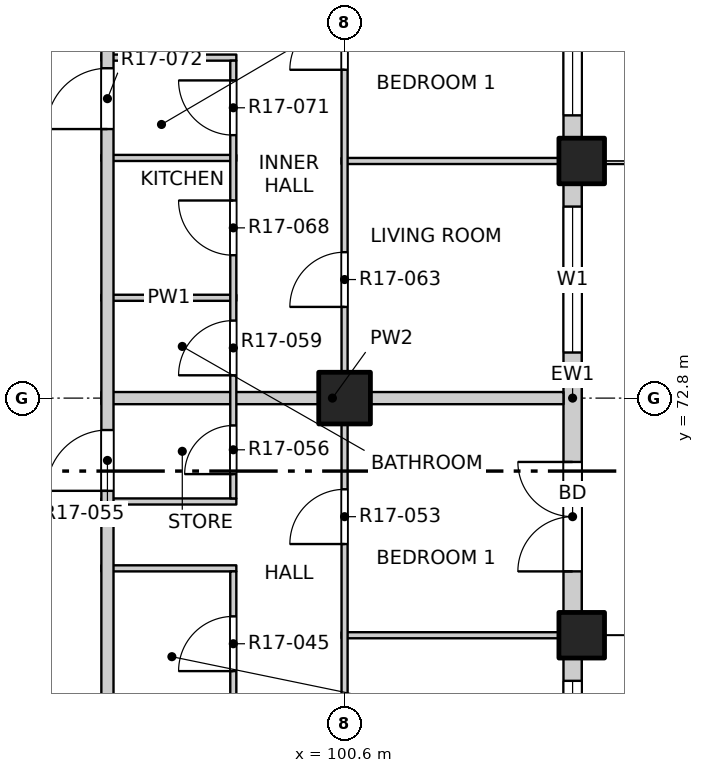
"""IFC4 building model, lengths in metres.
Left out: names, types, materials, properties, quantities, classifications, styles, units other than length and angle.
Written with IfcOpenShell. Run it as: python <this file> out.ifc"""

import sys

from ifc_helpers import new_model, si_unit, direction, frame, frame_2d, origin, origin_2d, place, context, subcontext, project, spatial, rectangle, extrude, element, fill, save


model = new_model("IFC4")
c1 = context("Model", 3, precision=1e-05, world=origin(), true_north=direction((0.0, 1.0)))
c2 = subcontext(c1, "Body", "Model", "MODEL_VIEW")
j1 = project(units=[si_unit("LENGTHUNIT", "METRE"), si_unit("PLANEANGLEUNIT", "RADIAN")], contexts=[c1])
p1 = place(None, origin())
s1 = spatial("IfcSite", under=j1, at=p1, CompositionType="ELEMENT")
p2 = place(p1, origin())
s2 = spatial("IfcBuilding", under=s1, at=p2, CompositionType="ELEMENT")
p3 = place(p2, frame((0.0, 0.0, 182.6)))
s3 = spatial("IfcBuildingStorey", under=s2, at=p3, CompositionType="ELEMENT", Elevation=182.6)
for number, where, z_axis, x_axis in (
    (1, (104.5, 68.9, -0.25), (0.0, 0.0, 1.0), (1.0, 0.0, 0.0)),
    (2, (104.5, 76.7, -0.25), (0.0, 0.0, 1.0), (1.0, 0.0, 0.0)),
):
    element("IfcColumn", number, at=place(p3, frame(where, z_axis=z_axis, x_axis=x_axis)), inside=s3, PredefinedType="COLUMN", context=c2, shape_type="SweptSolid", body=[
        extrude(rectangle(XDim=0.75, YDim=0.75, at=origin_2d()), origin(), (0.0, 0.0, 1.0), 3.4),
    ])
p4 = place(p3, frame((100.6, 72.8, -0.25), z_axis=(0.0, 0.0, 1.0), x_axis=(1.0, 0.0, 0.0)))
e3 = element("IfcColumn", 3, at=p4, inside=s3, PredefinedType="COLUMN", context=c2, shape_type="SweptSolid", body=[
    extrude(rectangle(XDim=0.85, YDim=0.85, at=origin_2d()), origin(), (0.0, 0.0, 1.0), 3.4),
])
p5 = place(p3, frame((104.35, 61.475, 0.0), z_axis=(0.0, 0.0, 1.0), x_axis=(0.0, 1.0, 0.0)))
e4 = element("IfcWall", 4, at=p5, inside=s3, PredefinedType="SOLIDWALL", context=c2, shape_type="SweptSolid", body=[
    extrude(rectangle(XDim=7.05, YDim=0.3, at=frame_2d((3.525, 0.0))), origin(), (0.0, 0.0, 1.0), 2.7),
])
p6 = place(p5, frame((0.675, 0.0, 0.0)))
e5 = element("IfcOpeningElement", 5, at=p6, cuts=e4, PredefinedType="OPENING", context=c2, shape_type="SweptSolid", body=[
    extrude(rectangle(XDim=1.8, YDim=2.4, at=frame_2d((0.9, 1.2))), frame((0.0, 0.16, 0.0), z_axis=(0.0, -1.0, 0.0), x_axis=(1.0, 0.0, 0.0)), (0.0, 0.0, 1.0), 0.32),
])
p7 = place(p5, frame((4.275, 0.0, 0.9)))
e6 = element("IfcOpeningElement", 6, at=p7, cuts=e4, PredefinedType="OPENING", context=c2, shape_type="SweptSolid", body=[
    extrude(rectangle(XDim=2.4, YDim=1.8, at=frame_2d((1.2, 0.9))), frame((0.0, 0.16, 0.0), z_axis=(0.0, -1.0, 0.0), x_axis=(1.0, 0.0, 0.0)), (0.0, 0.0, 1.0), 0.32),
])
p8 = place(p3, frame((104.35, 69.275, 0.0), z_axis=(0.0, 0.0, 1.0), x_axis=(0.0, 1.0, 0.0)))
e7 = element("IfcWall", 7, at=p8, inside=s3, PredefinedType="SOLIDWALL", context=c2, shape_type="SweptSolid", body=[
    extrude(rectangle(XDim=7.05, YDim=0.3, at=frame_2d((3.525, 0.0))), origin(), (0.0, 0.0, 1.0), 2.7),
])
p9 = place(p8, frame((0.675, 0.0, 0.0)))
e8 = element("IfcOpeningElement", 8, at=p9, cuts=e7, PredefinedType="OPENING", context=c2, shape_type="SweptSolid", body=[
    extrude(rectangle(XDim=1.8, YDim=2.4, at=frame_2d((0.9, 1.2))), frame((0.0, 0.16, 0.0), z_axis=(0.0, -1.0, 0.0), x_axis=(1.0, 0.0, 0.0)), (0.0, 0.0, 1.0), 0.32),
])
p10 = place(p8, frame((4.275, 0.0, 0.9)))
e9 = element("IfcOpeningElement", 9, at=p10, cuts=e7, PredefinedType="OPENING", context=c2, shape_type="SweptSolid", body=[
    extrude(rectangle(XDim=2.4, YDim=1.8, at=frame_2d((1.2, 0.9))), frame((0.0, 0.16, 0.0), z_axis=(0.0, -1.0, 0.0), x_axis=(1.0, 0.0, 0.0)), (0.0, 0.0, 1.0), 0.32),
])
p11 = place(p3, frame((104.35, 77.075, 0.0), z_axis=(0.0, 0.0, 1.0), x_axis=(0.0, 1.0, 0.0)))
e10 = element("IfcWall", 10, at=p11, inside=s3, PredefinedType="SOLIDWALL", context=c2, shape_type="SweptSolid", body=[
    extrude(rectangle(XDim=3.525, YDim=0.3, at=frame_2d((1.763, 0.0))), origin(), (0.0, 0.0, 1.0), 2.7),
])
p12 = place(p11, frame((0.375, 0.0, 0.9)))
e11 = element("IfcOpeningElement", 11, at=p12, cuts=e10, PredefinedType="OPENING", context=c2, shape_type="SweptSolid", body=[
    extrude(rectangle(XDim=2.4, YDim=1.8, at=frame_2d((1.2, 0.9))), frame((0.0, 0.16, 0.0), z_axis=(0.0, -1.0, 0.0), x_axis=(1.0, 0.0, 0.0)), (0.0, 0.0, 1.0), 0.32),
])
p13 = place(p3, frame((100.55, 68.9, 0.0), z_axis=(0.0, 0.0, 1.0), x_axis=(1.0, 0.0, 0.0)))
e12 = element("IfcWall", 12, at=p13, inside=s3, PredefinedType="PARTITIONING", context=c2, shape_type="SweptSolid", body=[
    extrude(rectangle(XDim=3.65, YDim=0.1, at=frame_2d((1.825, 0.0))), origin(), (0.0, 0.0, 1.0), 2.55),
])
for number, where, z_axis, x_axis in (
    (13, (96.6, 70.0, 0.0), (0.0, 0.0, 1.0), (1.0, 0.0, 0.0)),
    (14, (96.6, 71.1, 0.0), (0.0, 0.0, 1.0), (1.0, 0.0, 0.0)),
):
    element("IfcWall", number, at=place(p3, frame(where, z_axis=z_axis, x_axis=x_axis)), inside=s3, PredefinedType="PARTITIONING", context=c2, shape_type="SweptSolid", body=[
        extrude(rectangle(XDim=2.22, YDim=0.1, at=frame_2d((1.11, 0.0))), origin(), (0.0, 0.0, 1.0), 3.15),
    ])
p14 = place(p3, frame((96.6, 72.8, 0.0), z_axis=(0.0, 0.0, 1.0), x_axis=(1.0, 0.0, 0.0)))
e15 = element("IfcWall", 15, at=p14, inside=s3, PredefinedType="PARTITIONING", context=c2, shape_type="SweptSolid", body=[
    extrude(rectangle(XDim=7.6, YDim=0.2, at=frame_2d((3.8, 0.0))), origin(), (0.0, 0.0, 1.0), 3.15),
])
p15 = place(p3, frame((96.6, 74.45, 0.0), z_axis=(0.0, 0.0, 1.0), x_axis=(1.0, 0.0, 0.0)))
e16 = element("IfcWall", 16, at=p15, inside=s3, PredefinedType="PARTITIONING", context=c2, shape_type="SweptSolid", body=[
    extrude(rectangle(XDim=2.22, YDim=0.1, at=frame_2d((1.11, 0.0))), origin(), (0.0, 0.0, 1.0), 3.15),
])
p16 = place(p3, frame((100.55, 76.7, 0.0), z_axis=(0.0, 0.0, 1.0), x_axis=(1.0, 0.0, 0.0)))
e17 = element("IfcWall", 17, at=p16, inside=s3, PredefinedType="PARTITIONING", context=c2, shape_type="SweptSolid", body=[
    extrude(rectangle(XDim=3.65, YDim=0.1, at=frame_2d((1.825, 0.0))), origin(), (0.0, 0.0, 1.0), 2.55),
])
p17 = place(p3, frame((96.6, 76.75, 0.0), z_axis=(0.0, 0.0, 1.0), x_axis=(1.0, 0.0, 0.0)))
e18 = element("IfcWall", 18, at=p17, inside=s3, PredefinedType="PARTITIONING", context=c2, shape_type="SweptSolid", body=[
    extrude(rectangle(XDim=2.22, YDim=0.1, at=frame_2d((1.11, 0.0))), origin(), (0.0, 0.0, 1.0), 2.55),
])
p18 = place(p3, frame((96.6, 78.4, 0.0), z_axis=(0.0, 0.0, 1.0), x_axis=(1.0, 0.0, 0.0)))
e19 = element("IfcWall", 19, at=p18, inside=s3, PredefinedType="PARTITIONING", context=c2, shape_type="SweptSolid", body=[
    extrude(rectangle(XDim=2.22, YDim=0.1, at=frame_2d((1.11, 0.0))), origin(), (0.0, 0.0, 1.0), 3.15),
])
p19 = place(p3, frame((96.7, 49.5, 0.0), z_axis=(0.0, 0.0, 1.0), x_axis=(0.0, 1.0, 0.0)))
e20 = element("IfcWall", 20, at=p19, inside=s3, PredefinedType="PARTITIONING", context=c2, shape_type="SweptSolid", body=[
    extrude(rectangle(XDim=34.7, YDim=0.2, at=frame_2d((17.35, 0.0))), origin(), (0.0, 0.0, 1.0), 3.15),
])
p20 = place(p19, frame((6.875, 0.0, 0.0)))
e21 = element("IfcOpeningElement", 21, at=p20, cuts=e20, PredefinedType="OPENING", context=c2, shape_type="SweptSolid", body=[
    extrude(rectangle(XDim=1.0, YDim=2.1, at=frame_2d((0.5, 1.05))), frame((0.0, 0.11, 0.0), z_axis=(0.0, -1.0, 0.0), x_axis=(1.0, 0.0, 0.0)), (0.0, 0.0, 1.0), 0.22),
])
p21 = place(p19, frame((21.775, 0.0, 0.0)))
e22 = element("IfcOpeningElement", 22, at=p21, cuts=e20, PredefinedType="OPENING", context=c2, shape_type="SweptSolid", body=[
    extrude(rectangle(XDim=1.0, YDim=2.1, at=frame_2d((0.5, 1.05))), frame((0.0, 0.11, 0.0), z_axis=(0.0, -1.0, 0.0), x_axis=(1.0, 0.0, 0.0)), (0.0, 0.0, 1.0), 0.22),
])
p22 = place(p19, frame((27.725, 0.0, 0.0)))
e23 = element("IfcOpeningElement", 23, at=p22, cuts=e20, PredefinedType="OPENING", context=c2, shape_type="SweptSolid", body=[
    extrude(rectangle(XDim=1.0, YDim=2.1, at=frame_2d((0.5, 1.05))), frame((0.0, 0.11, 0.0), z_axis=(0.0, -1.0, 0.0), x_axis=(1.0, 0.0, 0.0)), (0.0, 0.0, 1.0), 0.22),
])
p23 = place(p3, frame((98.77, 56.25, 0.0), z_axis=(0.0, 0.0, 1.0), x_axis=(0.0, 1.0, 0.0)))
e24 = element("IfcWall", 24, at=p23, inside=s3, PredefinedType="PARTITIONING", context=c2, shape_type="SweptSolid", body=[
    extrude(rectangle(XDim=13.7, YDim=0.1, at=frame_2d((6.85, 0.0))), origin(), (0.0, 0.0, 1.0), 3.15),
])
p24 = place(p23, frame((0.325, 0.0, 0.0)))
e25 = element("IfcOpeningElement", 25, at=p24, cuts=e24, PredefinedType="OPENING", context=c2, shape_type="SweptSolid", body=[
    extrude(rectangle(XDim=0.8, YDim=2.1, at=frame_2d((0.4, 1.05))), frame((0.0, 0.06, 0.0), z_axis=(0.0, -1.0, 0.0), x_axis=(1.0, 0.0, 0.0)), (0.0, 0.0, 1.0), 0.12),
])
p25 = place(p23, frame((1.95, 0.0, 0.0)))
e26 = element("IfcOpeningElement", 26, at=p25, cuts=e24, PredefinedType="OPENING", context=c2, shape_type="SweptSolid", body=[
    extrude(rectangle(XDim=0.9, YDim=2.1, at=frame_2d((0.45, 1.05))), frame((0.0, 0.06, 0.0), z_axis=(0.0, -1.0, 0.0), x_axis=(1.0, 0.0, 0.0)), (0.0, 0.0, 1.0), 0.12),
])
p26 = place(p23, frame((3.675, 0.0, 0.0)))
e27 = element("IfcOpeningElement", 27, at=p26, cuts=e24, PredefinedType="OPENING", context=c2, shape_type="SweptSolid", body=[
    extrude(rectangle(XDim=0.8, YDim=2.1, at=frame_2d((0.4, 1.05))), frame((0.0, 0.06, 0.0), z_axis=(0.0, -1.0, 0.0), x_axis=(1.0, 0.0, 0.0)), (0.0, 0.0, 1.0), 0.12),
])
p27 = place(p23, frame((6.16, 0.0, 0.0)))
e28 = element("IfcOpeningElement", 28, at=p27, cuts=e24, PredefinedType="OPENING", context=c2, shape_type="SweptSolid", body=[
    extrude(rectangle(XDim=0.9, YDim=2.1, at=frame_2d((0.45, 1.05))), frame((0.0, 0.06, 0.0), z_axis=(0.0, -1.0, 0.0), x_axis=(1.0, 0.0, 0.0)), (0.0, 0.0, 1.0), 0.12),
])
p28 = place(p23, frame((9.42, 0.0, 0.0)))
e29 = element("IfcOpeningElement", 29, at=p28, cuts=e24, PredefinedType="OPENING", context=c2, shape_type="SweptSolid", body=[
    extrude(rectangle(XDim=0.8, YDim=2.1, at=frame_2d((0.4, 1.05))), frame((0.0, 0.06, 0.0), z_axis=(0.0, -1.0, 0.0), x_axis=(1.0, 0.0, 0.0)), (0.0, 0.0, 1.0), 0.12),
])
p29 = place(p23, frame((12.06, 0.0, 0.0)))
e30 = element("IfcOpeningElement", 30, at=p29, cuts=e24, PredefinedType="OPENING", context=c2, shape_type="SweptSolid", body=[
    extrude(rectangle(XDim=0.9, YDim=2.1, at=frame_2d((0.45, 1.05))), frame((0.0, 0.06, 0.0), z_axis=(0.0, -1.0, 0.0), x_axis=(1.0, 0.0, 0.0)), (0.0, 0.0, 1.0), 0.12),
])
p30 = place(p3, frame((98.77, 71.15, 0.0), z_axis=(0.0, 0.0, 1.0), x_axis=(0.0, 1.0, 0.0)))
e31 = element("IfcWall", 31, at=p30, inside=s3, PredefinedType="PARTITIONING", context=c2, shape_type="SweptSolid", body=[
    extrude(rectangle(XDim=7.2, YDim=0.1, at=frame_2d((3.6, 0.0))), origin(), (0.0, 0.0, 1.0), 3.15),
])
p31 = place(p30, frame((0.4, 0.0, 0.0)))
e32 = element("IfcOpeningElement", 32, at=p31, cuts=e31, PredefinedType="OPENING", context=c2, shape_type="SweptSolid", body=[
    extrude(rectangle(XDim=0.8, YDim=2.1, at=frame_2d((0.4, 1.05))), frame((0.0, 0.06, 0.0), z_axis=(0.0, -1.0, 0.0), x_axis=(1.0, 0.0, 0.0)), (0.0, 0.0, 1.0), 0.12),
])
p32 = place(p30, frame((2.025, 0.0, 0.0)))
e33 = element("IfcOpeningElement", 33, at=p32, cuts=e31, PredefinedType="OPENING", context=c2, shape_type="SweptSolid", body=[
    extrude(rectangle(XDim=0.9, YDim=2.1, at=frame_2d((0.45, 1.05))), frame((0.0, 0.06, 0.0), z_axis=(0.0, -1.0, 0.0), x_axis=(1.0, 0.0, 0.0)), (0.0, 0.0, 1.0), 0.12),
])
p33 = place(p30, frame((4.0, 0.0, 0.0)))
e34 = element("IfcOpeningElement", 34, at=p33, cuts=e31, PredefinedType="OPENING", context=c2, shape_type="SweptSolid", body=[
    extrude(rectangle(XDim=0.9, YDim=2.1, at=frame_2d((0.45, 1.05))), frame((0.0, 0.06, 0.0), z_axis=(0.0, -1.0, 0.0), x_axis=(1.0, 0.0, 0.0)), (0.0, 0.0, 1.0), 0.12),
])
p34 = place(p30, frame((5.975, 0.0, 0.0)))
e35 = element("IfcOpeningElement", 35, at=p34, cuts=e31, PredefinedType="OPENING", context=c2, shape_type="SweptSolid", body=[
    extrude(rectangle(XDim=0.9, YDim=2.1, at=frame_2d((0.45, 1.05))), frame((0.0, 0.06, 0.0), z_axis=(0.0, -1.0, 0.0), x_axis=(1.0, 0.0, 0.0)), (0.0, 0.0, 1.0), 0.12),
])
p35 = place(p3, frame((100.6, 45.8, 0.0), z_axis=(0.0, 0.0, 1.0), x_axis=(0.0, 1.0, 0.0)))
e36 = element("IfcWall", 36, at=p35, inside=s3, PredefinedType="PARTITIONING", context=c2, shape_type="SweptSolid", body=[
    extrude(rectangle(XDim=38.4, YDim=0.1, at=frame_2d((19.2, 0.0))), origin(), (0.0, 0.0, 1.0), 3.15),
])
p36 = place(p35, frame((1.05, 0.0, 0.0)))
e37 = element("IfcOpeningElement", 37, at=p36, cuts=e36, PredefinedType="OPENING", context=c2, shape_type="SweptSolid", body=[
    extrude(rectangle(XDim=1.2, YDim=2.1, at=frame_2d((0.6, 1.05))), frame((0.0, 0.06, 0.0), z_axis=(0.0, -1.0, 0.0), x_axis=(1.0, 0.0, 0.0)), (0.0, 0.0, 1.0), 0.12),
])
p37 = place(p35, frame((5.1, 0.0, 0.0)))
e38 = element("IfcOpeningElement", 38, at=p37, cuts=e36, PredefinedType="OPENING", context=c2, shape_type="SweptSolid", body=[
    extrude(rectangle(XDim=0.9, YDim=2.1, at=frame_2d((0.45, 1.05))), frame((0.0, 0.06, 0.0), z_axis=(0.0, -1.0, 0.0), x_axis=(1.0, 0.0, 0.0)), (0.0, 0.0, 1.0), 0.12),
])
p38 = place(p35, frame((9.0, 0.0, 0.0)))
e39 = element("IfcOpeningElement", 39, at=p38, cuts=e36, PredefinedType="OPENING", context=c2, shape_type="SweptSolid", body=[
    extrude(rectangle(XDim=0.9, YDim=2.1, at=frame_2d((0.45, 1.05))), frame((0.0, 0.06, 0.0), z_axis=(0.0, -1.0, 0.0), x_axis=(1.0, 0.0, 0.0)), (0.0, 0.0, 1.0), 0.12),
])
p39 = place(p35, frame((12.9, 0.0, 0.0)))
e40 = element("IfcOpeningElement", 40, at=p39, cuts=e36, PredefinedType="OPENING", context=c2, shape_type="SweptSolid", body=[
    extrude(rectangle(XDim=0.9, YDim=2.1, at=frame_2d((0.45, 1.05))), frame((0.0, 0.06, 0.0), z_axis=(0.0, -1.0, 0.0), x_axis=(1.0, 0.0, 0.0)), (0.0, 0.0, 1.0), 0.12),
])
p40 = place(p35, frame((19.725, 0.0, 0.0)))
e41 = element("IfcOpeningElement", 41, at=p40, cuts=e36, PredefinedType="OPENING", context=c2, shape_type="SweptSolid", body=[
    extrude(rectangle(XDim=1.2, YDim=2.1, at=frame_2d((0.6, 1.05))), frame((0.0, 0.06, 0.0), z_axis=(0.0, -1.0, 0.0), x_axis=(1.0, 0.0, 0.0)), (0.0, 0.0, 1.0), 0.12),
])
p41 = place(p35, frame((24.6, 0.0, 0.0)))
e42 = element("IfcOpeningElement", 42, at=p41, cuts=e36, PredefinedType="OPENING", context=c2, shape_type="SweptSolid", body=[
    extrude(rectangle(XDim=0.9, YDim=2.1, at=frame_2d((0.45, 1.05))), frame((0.0, 0.06, 0.0), z_axis=(0.0, -1.0, 0.0), x_axis=(1.0, 0.0, 0.0)), (0.0, 0.0, 1.0), 0.12),
])
p42 = place(p35, frame((28.5, 0.0, 0.0)))
e43 = element("IfcOpeningElement", 43, at=p42, cuts=e36, PredefinedType="OPENING", context=c2, shape_type="SweptSolid", body=[
    extrude(rectangle(XDim=0.9, YDim=2.1, at=frame_2d((0.45, 1.05))), frame((0.0, 0.06, 0.0), z_axis=(0.0, -1.0, 0.0), x_axis=(1.0, 0.0, 0.0)), (0.0, 0.0, 1.0), 0.12),
])
p43 = place(p35, frame((32.4, 0.0, 0.0)))
e44 = element("IfcOpeningElement", 44, at=p43, cuts=e36, PredefinedType="OPENING", context=c2, shape_type="SweptSolid", body=[
    extrude(rectangle(XDim=0.9, YDim=2.1, at=frame_2d((0.45, 1.05))), frame((0.0, 0.06, 0.0), z_axis=(0.0, -1.0, 0.0), x_axis=(1.0, 0.0, 0.0)), (0.0, 0.0, 1.0), 0.12),
])
p44 = place(p35, frame((36.15, 0.0, 0.0)))
e45 = element("IfcOpeningElement", 45, at=p44, cuts=e36, PredefinedType="OPENING", context=c2, shape_type="SweptSolid", body=[
    extrude(rectangle(XDim=1.2, YDim=2.1, at=frame_2d((0.6, 1.05))), frame((0.0, 0.06, 0.0), z_axis=(0.0, -1.0, 0.0), x_axis=(1.0, 0.0, 0.0)), (0.0, 0.0, 1.0), 0.12),
])
p45 = place(p7, origin())
e46 = element("IfcWindow", 46, at=p45, inside=s3, PartitioningType="DOUBLE_PANEL_VERTICAL", PredefinedType="WINDOW", context=c2, shape_type="SweptSolid", body=[
    extrude(rectangle(XDim=2.4, YDim=1.8, at=frame_2d((1.2, 0.9))), frame((0.0, 0.03, 0.0), z_axis=(0.0, -1.0, 0.0), x_axis=(1.0, 0.0, 0.0)), (0.0, 0.0, 1.0), 0.06),
])
fill(e6, e46)
p46 = place(p9, origin())
e47 = element("IfcDoor", 47, at=p46, inside=s3, OperationType="DOUBLE_DOOR_SINGLE_SWING", PredefinedType="DOOR", context=c2, shape_type="SweptSolid", body=[
    extrude(rectangle(XDim=1.8, YDim=2.4, at=frame_2d((0.9, 1.2))), frame((0.0, 0.025, 0.0), z_axis=(0.0, -1.0, 0.0), x_axis=(1.0, 0.0, 0.0)), (0.0, 0.0, 1.0), 0.05),
])
fill(e8, e47)
p47 = place(p10, origin())
e48 = element("IfcWindow", 48, at=p47, inside=s3, PartitioningType="DOUBLE_PANEL_VERTICAL", PredefinedType="WINDOW", context=c2, shape_type="SweptSolid", body=[
    extrude(rectangle(XDim=2.4, YDim=1.8, at=frame_2d((1.2, 0.9))), frame((0.0, 0.03, 0.0), z_axis=(0.0, -1.0, 0.0), x_axis=(1.0, 0.0, 0.0)), (0.0, 0.0, 1.0), 0.06),
])
fill(e9, e48)
p48 = place(p12, origin())
e49 = element("IfcWindow", 49, at=p48, inside=s3, PartitioningType="DOUBLE_PANEL_VERTICAL", PredefinedType="WINDOW", context=c2, shape_type="SweptSolid", body=[
    extrude(rectangle(XDim=2.4, YDim=1.8, at=frame_2d((1.2, 0.9))), frame((0.0, 0.03, 0.0), z_axis=(0.0, -1.0, 0.0), x_axis=(1.0, 0.0, 0.0)), (0.0, 0.0, 1.0), 0.06),
])
fill(e11, e49)
p49 = place(p29, origin())
e50 = element("IfcDoor", 50, at=p49, inside=s3, OperationType="SINGLE_SWING_LEFT", PredefinedType="DOOR", context=c2, shape_type="SweptSolid", body=[
    extrude(rectangle(XDim=0.9, YDim=2.1, at=frame_2d((0.45, 1.05))), frame((0.0, 0.025, 0.0), z_axis=(0.0, -1.0, 0.0), x_axis=(1.0, 0.0, 0.0)), (0.0, 0.0, 1.0), 0.05),
])
fill(e30, e50)
p50 = place(p41, origin())
e51 = element("IfcDoor", 51, at=p50, inside=s3, OperationType="SINGLE_SWING_LEFT", PredefinedType="DOOR", context=c2, shape_type="SweptSolid", body=[
    extrude(rectangle(XDim=0.9, YDim=2.1, at=frame_2d((0.45, 1.05))), frame((0.0, 0.025, 0.0), z_axis=(0.0, -1.0, 0.0), x_axis=(1.0, 0.0, 0.0)), (0.0, 0.0, 1.0), 0.05),
])
fill(e42, e51)
p51 = place(p21, origin())
e52 = element("IfcDoor", 52, at=p51, inside=s3, OperationType="SINGLE_SWING_LEFT", PredefinedType="DOOR", context=c2, shape_type="SweptSolid", body=[
    extrude(rectangle(XDim=1.0, YDim=2.1, at=frame_2d((0.5, 1.05))), frame((0.0, 0.025, 0.0), z_axis=(0.0, -1.0, 0.0), x_axis=(1.0, 0.0, 0.0)), (0.0, 0.0, 1.0), 0.05),
])
fill(e22, e52)
p52 = place(p31, origin())
e53 = element("IfcDoor", 53, at=p52, inside=s3, OperationType="SINGLE_SWING_LEFT", PredefinedType="DOOR", context=c2, shape_type="SweptSolid", body=[
    extrude(rectangle(XDim=0.8, YDim=2.1, at=frame_2d((0.4, 1.05))), frame((0.0, 0.025, 0.0), z_axis=(0.0, -1.0, 0.0), x_axis=(1.0, 0.0, 0.0)), (0.0, 0.0, 1.0), 0.05),
])
fill(e32, e53)
p53 = place(p32, origin())
e54 = element("IfcDoor", 54, at=p53, inside=s3, OperationType="SINGLE_SWING_LEFT", PredefinedType="DOOR", context=c2, shape_type="SweptSolid", body=[
    extrude(rectangle(XDim=0.9, YDim=2.1, at=frame_2d((0.45, 1.05))), frame((0.0, 0.025, 0.0), z_axis=(0.0, -1.0, 0.0), x_axis=(1.0, 0.0, 0.0)), (0.0, 0.0, 1.0), 0.05),
])
fill(e33, e54)
p54 = place(p42, origin())
e55 = element("IfcDoor", 55, at=p54, inside=s3, OperationType="SINGLE_SWING_LEFT", PredefinedType="DOOR", context=c2, shape_type="SweptSolid", body=[
    extrude(rectangle(XDim=0.9, YDim=2.1, at=frame_2d((0.45, 1.05))), frame((0.0, 0.025, 0.0), z_axis=(0.0, -1.0, 0.0), x_axis=(1.0, 0.0, 0.0)), (0.0, 0.0, 1.0), 0.05),
])
fill(e43, e55)
p55 = place(p33, origin())
e56 = element("IfcDoor", 56, at=p55, inside=s3, OperationType="SINGLE_SWING_RIGHT", PredefinedType="DOOR", context=c2, shape_type="SweptSolid", body=[
    extrude(rectangle(XDim=0.9, YDim=2.1, at=frame_2d((0.45, 1.05))), frame((0.0, 0.025, 0.0), z_axis=(0.0, -1.0, 0.0), x_axis=(1.0, 0.0, 0.0)), (0.0, 0.0, 1.0), 0.05),
])
fill(e34, e56)
p56 = place(p34, origin())
e57 = element("IfcDoor", 57, at=p56, inside=s3, OperationType="SINGLE_SWING_RIGHT", PredefinedType="DOOR", context=c2, shape_type="SweptSolid", body=[
    extrude(rectangle(XDim=0.9, YDim=2.1, at=frame_2d((0.45, 1.05))), frame((0.0, 0.025, 0.0), z_axis=(0.0, -1.0, 0.0), x_axis=(1.0, 0.0, 0.0)), (0.0, 0.0, 1.0), 0.05),
])
fill(e35, e57)
p57 = place(p22, origin())
e58 = element("IfcDoor", 58, at=p57, inside=s3, OperationType="SINGLE_SWING_RIGHT", PredefinedType="DOOR", context=c2, shape_type="SweptSolid", body=[
    extrude(rectangle(XDim=1.0, YDim=2.1, at=frame_2d((0.5, 1.05))), frame((0.0, 0.025, 0.0), z_axis=(0.0, -1.0, 0.0), x_axis=(1.0, 0.0, 0.0)), (0.0, 0.0, 1.0), 0.05),
])
fill(e23, e58)
p58 = place(p43, origin())
e59 = element("IfcDoor", 59, at=p58, inside=s3, OperationType="SINGLE_SWING_LEFT", PredefinedType="DOOR", context=c2, shape_type="SweptSolid", body=[
    extrude(rectangle(XDim=0.9, YDim=2.1, at=frame_2d((0.45, 1.05))), frame((0.0, 0.025, 0.0), z_axis=(0.0, -1.0, 0.0), x_axis=(1.0, 0.0, 0.0)), (0.0, 0.0, 1.0), 0.05),
])
fill(e44, e59)
save(model, sys.argv[1])
